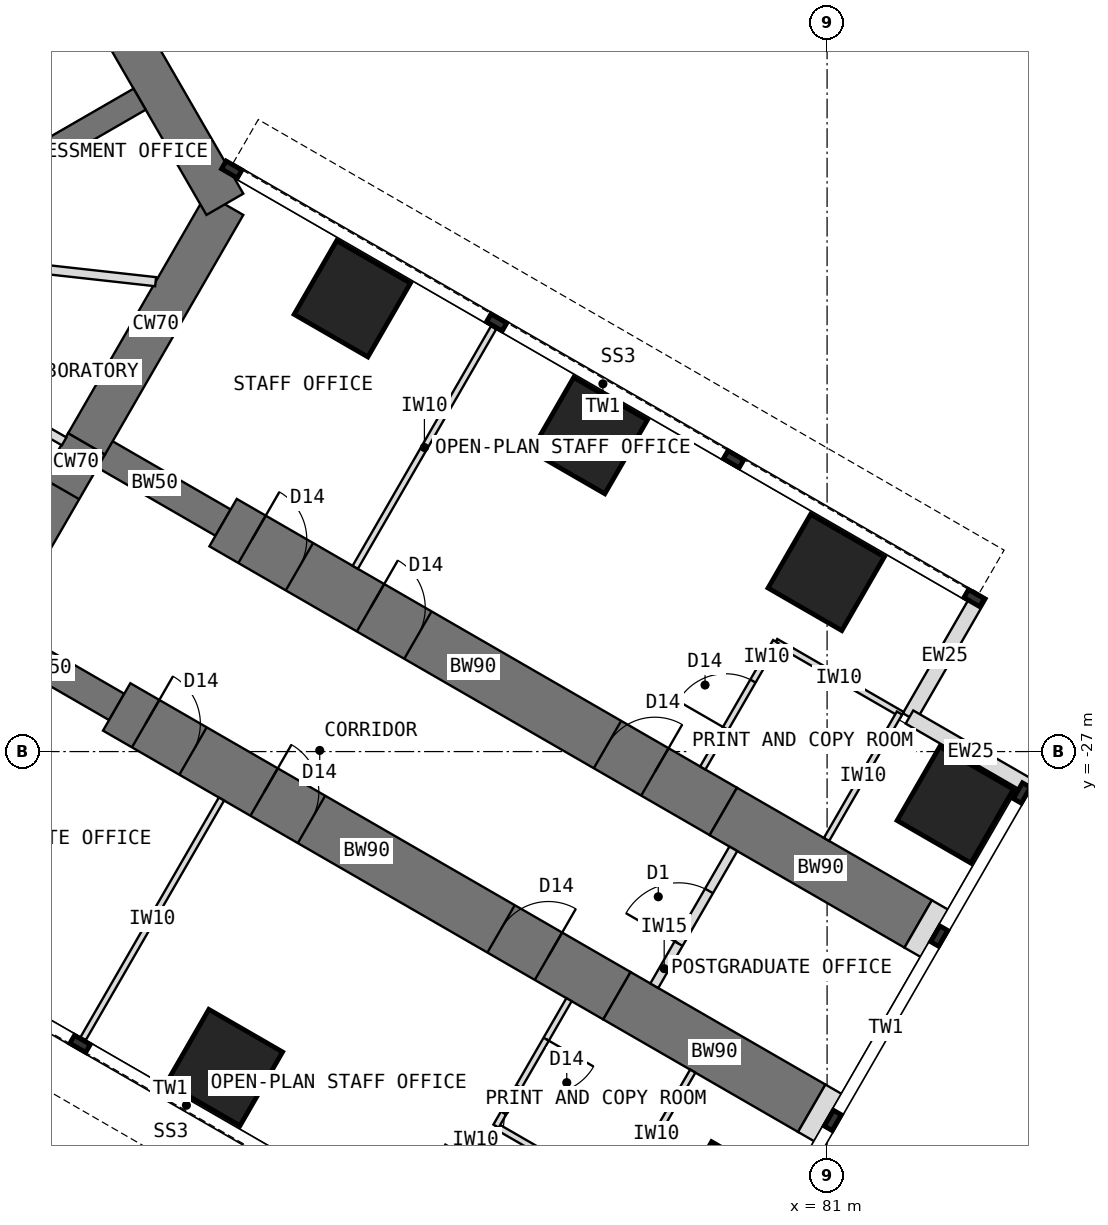
"""IFC4 building model, lengths in metres.
Left out: names, types, materials, properties, quantities, classifications, styles, units other than length and angle.
Written with IfcOpenShell. Run it as: python <this file> out.ifc"""

import sys

from ifc_helpers import new_model, si_unit, direction, frame, frame_2d, origin, origin_2d, place, context, subcontext, project, spatial, rectangle, extrude, element, fill, save


model = new_model("IFC4")
c1 = context("Model", 3, precision=1e-05, world=origin(), true_north=direction((0.0, 1.0)))
c2 = subcontext(c1, "Body", "Model", "MODEL_VIEW")
j1 = project(units=[si_unit("LENGTHUNIT", "METRE"), si_unit("PLANEANGLEUNIT", "RADIAN")], contexts=[c1])
p1 = place(None, origin())
s1 = spatial("IfcSite", under=j1, at=p1, CompositionType="ELEMENT")
p2 = place(p1, origin())
s2 = spatial("IfcBuilding", under=s1, at=p2, CompositionType="ELEMENT")
p3 = place(p2, frame((0.0, 0.0, 72.5)))
s3 = spatial("IfcBuildingStorey", under=s2, at=p3, CompositionType="ELEMENT", Elevation=72.5)
p4 = place(p3, frame((67.072, -24.97, 0.0), z_axis=(0.0, 0.0, 1.0), x_axis=(0.500010275428, 0.866019471182, 0.0)))
e1 = element("IfcWall", 1, at=p4, inside=s3, PredefinedType="SHEAR", context=c2, shape_type="SweptSolid", body=[
    extrude(rectangle(XDim=3.5, YDim=0.7, at=frame_2d((1.75, 0.0))), origin(), (0.0, 0.0, 1.0), 4.0),
])
p5 = place(p4, frame((0.85, 0.0, 0.0)))
e2 = element("IfcOpeningElement", 2, at=p5, cuts=e1, PredefinedType="OPENING", context=c2, shape_type="SweptSolid", body=[
    extrude(rectangle(XDim=1.8, YDim=2.1, at=frame_2d((0.9, 1.05))), frame((0.0, 0.36, 0.0), z_axis=(0.0, -1.0, 0.0), x_axis=(1.0, 0.0, 0.0)), (0.0, 0.0, 1.0), 0.72),
])
p6 = place(p3, frame((68.822, -21.939, 0.0), z_axis=(0.0, 0.0, 1.0), x_axis=(0.500024481964, 0.866011268655, 0.0)))
e3 = element("IfcWall", 3, at=p6, inside=s3, PredefinedType="SHEAR", context=c2, shape_type="SweptSolid", body=[
    extrude(rectangle(XDim=4.548, YDim=0.7, at=frame_2d((2.274, 0.0))), origin(), (0.0, 0.0, 1.0), 4.0),
])
p7 = place(p3, frame((71.096, -18.0, 0.0), z_axis=(0.0, 0.0, 1.0), x_axis=(-0.500005998175, 0.866021940709, 0.0)))
e4 = element("IfcWall", 4, at=p7, inside=s3, PredefinedType="SHEAR", context=c2, shape_type="SweptSolid", body=[
    extrude(rectangle(XDim=12.596, YDim=0.7, at=frame_2d((6.298, 0.0))), origin(), (0.0, 0.0, 1.0), 4.0),
])
p8 = place(p3, frame((68.822, -21.939, 0.0), z_axis=(0.0, 0.0, 1.0), x_axis=(0.866072649678, -0.499918158782, 0.0)))
e5 = element("IfcWall", 5, at=p8, inside=s3, PredefinedType="SHEAR", context=c2, shape_type="SweptSolid", body=[
    extrude(rectangle(XDim=2.592, YDim=0.5, at=frame_2d((1.296, 0.0))), origin(), (0.0, 0.0, 1.0), 4.0),
])
p9 = place(p3, frame((71.066, -23.234, 0.0), z_axis=(0.0, 0.0, 1.0), x_axis=(0.86602681393, -0.499997557548, 0.0)))
e6 = element("IfcWall", 6, at=p9, inside=s3, PredefinedType="SHEAR", context=c2, shape_type="SweptSolid", body=[
    extrude(rectangle(XDim=9.5, YDim=0.9, at=frame_2d((4.75, 0.0))), origin(), (0.0, 0.0, 1.0), 4.0),
])
p10 = place(p9, frame((0.55, 0.0, 0.0)))
e7 = element("IfcOpeningElement", 7, at=p10, cuts=e6, PredefinedType="OPENING", context=c2, shape_type="SweptSolid", body=[
    extrude(rectangle(XDim=0.9, YDim=2.1, at=frame_2d((0.45, 1.05))), frame((0.0, 0.46, 0.0), z_axis=(0.0, -1.0, 0.0), x_axis=(1.0, 0.0, 0.0)), (0.0, 0.0, 1.0), 0.92),
])
p11 = place(p9, frame((2.8, 0.0, 0.0)))
e8 = element("IfcOpeningElement", 8, at=p11, cuts=e6, PredefinedType="OPENING", context=c2, shape_type="SweptSolid", body=[
    extrude(rectangle(XDim=0.9, YDim=2.1, at=frame_2d((0.45, 1.05))), frame((0.0, 0.46, 0.0), z_axis=(0.0, -1.0, 0.0), x_axis=(1.0, 0.0, 0.0)), (0.0, 0.0, 1.0), 0.92),
])
p12 = place(p9, frame((7.3, 0.0, 0.0)))
e9 = element("IfcOpeningElement", 9, at=p12, cuts=e6, PredefinedType="OPENING", context=c2, shape_type="SweptSolid", body=[
    extrude(rectangle(XDim=0.9, YDim=2.1, at=frame_2d((0.45, 1.05))), frame((0.0, 0.46, 0.0), z_axis=(0.0, -1.0, 0.0), x_axis=(1.0, 0.0, 0.0)), (0.0, 0.0, 1.0), 0.92),
])
p13 = place(p3, frame((79.294, -27.984, 0.0), z_axis=(0.0, 0.0, 1.0), x_axis=(0.866000971088, -0.500042316284, 0.0)))
e10 = element("IfcWall", 10, at=p13, inside=s3, PredefinedType="SHEAR", context=c2, shape_type="SweptSolid", body=[
    extrude(rectangle(XDim=3.7, YDim=0.9, at=frame_2d((1.85, 0.0))), origin(), (0.0, 0.0, 1.0), 4.0),
])
p14 = place(p3, frame((67.072, -24.97, 0.0), z_axis=(0.0, 0.0, 1.0), x_axis=(0.866031863473, -0.499988811324, 0.0)))
e11 = element("IfcWall", 11, at=p14, inside=s3, PredefinedType="SHEAR", context=c2, shape_type="SweptSolid", body=[
    extrude(rectangle(XDim=2.592, YDim=0.5, at=frame_2d((1.296, 0.0))), origin(), (0.0, 0.0, 1.0), 4.0),
])
p15 = place(p3, frame((69.316, -26.266, 0.0), z_axis=(0.0, 0.0, 1.0), x_axis=(0.86602681393, -0.499997557548, 0.0)))
e12 = element("IfcWall", 12, at=p15, inside=s3, PredefinedType="SHEAR", context=c2, shape_type="SweptSolid", body=[
    extrude(rectangle(XDim=9.5, YDim=0.9, at=frame_2d((4.75, 0.0))), origin(), (0.0, 0.0, 1.0), 4.0),
])
p16 = place(p15, frame((0.55, 0.0, 0.0)))
e13 = element("IfcOpeningElement", 13, at=p16, cuts=e12, PredefinedType="OPENING", context=c2, shape_type="SweptSolid", body=[
    extrude(rectangle(XDim=0.9, YDim=2.1, at=frame_2d((0.45, 1.05))), frame((0.0, 0.46, 0.0), z_axis=(0.0, -1.0, 0.0), x_axis=(1.0, 0.0, 0.0)), (0.0, 0.0, 1.0), 0.92),
])
p17 = place(p15, frame((2.8, 0.0, 0.0)))
e14 = element("IfcOpeningElement", 14, at=p17, cuts=e12, PredefinedType="OPENING", context=c2, shape_type="SweptSolid", body=[
    extrude(rectangle(XDim=0.9, YDim=2.1, at=frame_2d((0.45, 1.05))), frame((0.0, 0.46, 0.0), z_axis=(0.0, -1.0, 0.0), x_axis=(1.0, 0.0, 0.0)), (0.0, 0.0, 1.0), 0.92),
])
p18 = place(p15, frame((7.3, 0.0, 0.0)))
e15 = element("IfcOpeningElement", 15, at=p18, cuts=e12, PredefinedType="OPENING", context=c2, shape_type="SweptSolid", body=[
    extrude(rectangle(XDim=0.9, YDim=2.1, at=frame_2d((0.45, 1.05))), frame((0.0, 0.46, 0.0), z_axis=(0.0, -1.0, 0.0), x_axis=(1.0, 0.0, 0.0)), (0.0, 0.0, 1.0), 0.92),
])
p19 = place(p3, frame((77.544, -31.016, 0.0), z_axis=(0.0, 0.0, 1.0), x_axis=(0.866029545028, -0.499992827086, 0.0)))
e16 = element("IfcWall", 16, at=p19, inside=s3, PredefinedType="SHEAR", context=c2, shape_type="SweptSolid", body=[
    extrude(rectangle(XDim=3.7, YDim=0.9, at=frame_2d((1.85, 0.0))), origin(), (0.0, 0.0, 1.0), 4.0),
])
for number, where, z_axis, x_axis in (
    (17, (73.191, -19.554, 0.0), (0.0, 0.0, 1.0), (0.5, 0.866, 0.0)),
    (18, (77.088, -21.804, 0.0), (0.0, 0.0, 1.0), (0.5, 0.866, 0.0)),
    (19, (71.088, -32.196, 0.0), (0.0, 0.0, 1.0), (0.5, 0.866, 0.0)),
    (20, (80.986, -24.054, 0.0), (0.0, 0.0, 1.0), (0.5, 0.866, 0.0)),
    (21, (83.108, -27.877, 0.0), (0.0, 0.0, 1.0), (0.5, 0.866, 0.0)),
    (22, (79.358, -34.373, 0.0), (0.0, 0.0, 1.0), (0.5, 0.866, 0.0)),
):
    element("IfcColumn", number, at=place(p3, frame(where, z_axis=z_axis, x_axis=x_axis)), inside=s3, PredefinedType="COLUMN", context=c2, shape_type="SweptSolid", body=[
        extrude(rectangle(XDim=1.4, YDim=1.4, at=origin_2d()), origin(), (0.0, 0.0, 1.0), 4.0),
    ])
for number, where, z_axis, x_axis in (
    (23, (83.517, -24.419, 0.0), (0.0, 0.0, 1.0), (-0.5, -0.866, 0.0)),
    (24, (82.355, -26.432, 0.0), (0.0, 0.0, 1.0), (0.866, -0.5, 0.0)),
):
    element("IfcWall", number, at=place(p3, frame(where, z_axis=z_axis, x_axis=x_axis)), inside=s3, PredefinedType="STANDARD", context=c2, shape_type="SweptSolid", body=[
        extrude(rectangle(XDim=2.325, YDim=0.25, at=frame_2d((1.163, 0.0))), origin(), (0.0, 0.0, 1.0), 3.8),
    ])
for number, where, z_axis, x_axis in (
    (25, (82.498, -29.834, 0.0), (0.0, 0.0, 1.0), (0.866, -0.5, 0.0)),
    (26, (80.748, -32.865, 0.0), (0.0, 0.0, 1.0), (0.866, -0.5, 0.0)),
):
    element("IfcWall", number, at=place(p3, frame(where, z_axis=z_axis, x_axis=x_axis)), inside=s3, PredefinedType="PARTITIONING", context=c2, shape_type="SweptSolid", body=[
        extrude(rectangle(XDim=0.31, YDim=0.9, at=frame_2d((0.155, 0.0))), origin(), (0.0, 0.0, 1.0), 3.8),
    ])
p20 = place(p3, frame((64.62, -19.201, 0.0), z_axis=(0.0, 0.0, 1.0), x_axis=(0.866023886965, 0.500002627198, 0.0)))
e27 = element("IfcWall", 27, at=p20, inside=s3, PredefinedType="SHEAR", context=c2, shape_type="SweptSolid", body=[
    extrude(rectangle(XDim=5.858, YDim=0.4, at=frame_2d((2.929, 0.0))), origin(), (0.0, 0.0, 1.0), 4.0),
])
p21 = place(p3, frame((73.24, -23.97, 0.0), z_axis=(0.0, 0.0, 1.0), x_axis=(0.499982560684, 0.866035472144, 0.0)))
e28 = element("IfcWall", 28, at=p21, inside=s3, PredefinedType="PARTITIONING", context=c2, shape_type="SweptSolid", body=[
    extrude(rectangle(XDim=4.55, YDim=0.1, at=frame_2d((2.275, 0.0))), origin(), (0.0, 0.0, 1.0), 3.8),
])
p22 = place(p3, frame((80.156, -25.191, 0.0), z_axis=(0.0, 0.0, 1.0), x_axis=(0.865980596518, -0.500077600433, 0.0)))
e29 = element("IfcWall", 29, at=p22, inside=s3, PredefinedType="PARTITIONING", context=c2, shape_type="SweptSolid", body=[
    extrude(rectangle(XDim=2.4, YDim=0.1, at=frame_2d((1.2, 0.0))), origin(), (0.0, 0.0, 1.0), 3.8),
])
p23 = place(p3, frame((78.956, -27.27, 0.0), z_axis=(0.0, 0.0, 1.0), x_axis=(0.500033551112, 0.866006032174, 0.0)))
e30 = element("IfcWall", 30, at=p23, inside=s3, PredefinedType="PARTITIONING", context=c2, shape_type="SweptSolid", body=[
    extrude(rectangle(XDim=2.4, YDim=0.1, at=frame_2d((1.2, 0.0))), origin(), (0.0, 0.0, 1.0), 3.8),
])
p24 = place(p23, frame((0.75, 0.0, 0.0)))
e31 = element("IfcOpeningElement", 31, at=p24, cuts=e30, PredefinedType="OPENING", context=c2, shape_type="SweptSolid", body=[
    extrude(rectangle(XDim=0.9, YDim=2.1, at=frame_2d((0.45, 1.05))), frame((0.0, 0.06, 0.0), z_axis=(0.0, -1.0, 0.0), x_axis=(1.0, 0.0, 0.0)), (0.0, 0.0, 1.0), 0.12),
])
p25 = place(p3, frame((80.991, -28.445, 0.0), z_axis=(0.0, 0.0, 1.0), x_axis=(0.500033551112, 0.866006032174, 0.0)))
e32 = element("IfcWall", 32, at=p25, inside=s3, PredefinedType="PARTITIONING", context=c2, shape_type="SweptSolid", body=[
    extrude(rectangle(XDim=2.4, YDim=0.1, at=frame_2d((1.2, 0.0))), origin(), (0.0, 0.0, 1.0), 3.8),
])
p26 = place(p3, frame((71.04, -27.78, 0.0), z_axis=(0.0, 0.0, 1.0), x_axis=(-0.499982560684, -0.866035472144, 0.0)))
e33 = element("IfcWall", 33, at=p26, inside=s3, PredefinedType="PARTITIONING", context=c2, shape_type="SweptSolid", body=[
    extrude(rectangle(XDim=4.55, YDim=0.1, at=frame_2d((2.275, 0.0))), origin(), (0.0, 0.0, 1.0), 3.8),
])
p27 = place(p3, frame((75.556, -33.159, 0.0), z_axis=(0.0, 0.0, 1.0), x_axis=(0.866024647952, -0.500001309137, 0.0)))
e34 = element("IfcWall", 34, at=p27, inside=s3, PredefinedType="PARTITIONING", context=c2, shape_type="SweptSolid", body=[
    extrude(rectangle(XDim=2.4, YDim=0.1, at=frame_2d((1.2, 0.0))), origin(), (0.0, 0.0, 1.0), 3.8),
])
p28 = place(p3, frame((76.756, -31.08, 0.0), z_axis=(0.0, 0.0, 1.0), x_axis=(-0.500001309137, -0.866024647952, 0.0)))
e35 = element("IfcWall", 35, at=p28, inside=s3, PredefinedType="PARTITIONING", context=c2, shape_type="SweptSolid", body=[
    extrude(rectangle(XDim=2.4, YDim=0.1, at=frame_2d((1.2, 0.0))), origin(), (0.0, 0.0, 1.0), 3.8),
])
p29 = place(p28, frame((0.75, 0.0, 0.0)))
e36 = element("IfcOpeningElement", 36, at=p29, cuts=e35, PredefinedType="OPENING", context=c2, shape_type="SweptSolid", body=[
    extrude(rectangle(XDim=0.9, YDim=2.1, at=frame_2d((0.45, 1.05))), frame((0.0, 0.06, 0.0), z_axis=(0.0, -1.0, 0.0), x_axis=(1.0, 0.0, 0.0)), (0.0, 0.0, 1.0), 0.12),
])
p30 = place(p3, frame((78.791, -32.255, 0.0), z_axis=(0.0, 0.0, 1.0), x_axis=(-0.500001309137, -0.866024647952, 0.0)))
e37 = element("IfcWall", 37, at=p30, inside=s3, PredefinedType="PARTITIONING", context=c2, shape_type="SweptSolid", body=[
    extrude(rectangle(XDim=2.4, YDim=0.1, at=frame_2d((1.2, 0.0))), origin(), (0.0, 0.0, 1.0), 3.8),
])
p31 = place(p3, frame((64.583, -19.664, 0.0), z_axis=(0.0, 0.0, 1.0), x_axis=(0.866025445582, -0.499999927604, 0.0)))
e38 = element("IfcWall", 38, at=p31, inside=s3, PredefinedType="PARTITIONING", context=c2, shape_type="SweptSolid", body=[
    extrude(rectangle(XDim=4.468, YDim=0.15, at=frame_2d((2.234, 0.0))), origin(), (0.0, 0.0, 1.0), 3.8),
])
p32 = place(p31, frame((1.744, 0.0, 0.0)))
e39 = element("IfcOpeningElement", 39, at=p32, cuts=e38, PredefinedType="OPENING", context=c2, shape_type="SweptSolid", body=[
    extrude(rectangle(XDim=1.0, YDim=2.1, at=frame_2d((0.5, 1.05))), frame((0.0, 0.085, 0.0), z_axis=(0.0, -1.0, 0.0), x_axis=(1.0, 0.0, 0.0)), (0.0, 0.0, 1.0), 0.17),
])
p33 = place(p3, frame((65.377, -18.764, 0.0), z_axis=(0.0, 0.0, 1.0), x_axis=(0.993886318744, -0.110408266965, 0.0)))
e40 = element("IfcWall", 40, at=p33, inside=s3, PredefinedType="PARTITIONING", context=c2, shape_type="SweptSolid", body=[
    extrude(rectangle(XDim=4.608, YDim=0.15, at=frame_2d((2.304, 0.0))), origin(), (0.0, 0.0, 1.0), 3.8),
])
p34 = place(p33, frame((1.804, 0.0, 0.0)))
e41 = element("IfcOpeningElement", 41, at=p34, cuts=e40, PredefinedType="OPENING", context=c2, shape_type="SweptSolid", body=[
    extrude(rectangle(XDim=1.0, YDim=2.1, at=frame_2d((0.5, 1.05))), frame((0.0, 0.085, 0.0), z_axis=(0.0, -1.0, 0.0), x_axis=(1.0, 0.0, 0.0)), (0.0, 0.0, 1.0), 0.17),
])
p35 = place(p3, frame((78.158, -30.851, 0.0), z_axis=(0.0, 0.0, 1.0), x_axis=(0.500006934395, 0.866021400173, 0.0)))
e42 = element("IfcWall", 42, at=p35, inside=s3, PredefinedType="PARTITIONING", context=c2, shape_type="SweptSolid", body=[
    extrude(rectangle(XDim=2.6, YDim=0.15, at=frame_2d((1.3, 0.0))), origin(), (0.0, 0.0, 1.0), 3.8),
])
p36 = place(p35, frame((0.8, 0.0, 0.0)))
e43 = element("IfcOpeningElement", 43, at=p36, cuts=e42, PredefinedType="OPENING", context=c2, shape_type="SweptSolid", body=[
    extrude(rectangle(XDim=1.0, YDim=2.1, at=frame_2d((0.5, 1.05))), frame((0.0, 0.085, 0.0), z_axis=(0.0, -1.0, 0.0), x_axis=(1.0, 0.0, 0.0)), (0.0, 0.0, 1.0), 0.17),
])
p37 = place(p5, origin())
e44 = element("IfcDoor", 44, at=p37, inside=s3, OperationType="DOUBLE_DOOR_DOUBLE_SWING", PredefinedType="DOOR", context=c2, shape_type="SweptSolid", body=[
    extrude(rectangle(XDim=1.72, YDim=2.06, at=frame_2d((0.9, 1.03))), frame((0.0, 0.025, 0.0), z_axis=(0.0, -1.0, 0.0), x_axis=(1.0, 0.0, 0.0)), (0.0, 0.0, 1.0), 0.05),
    extrude(rectangle(XDim=0.04, YDim=2.1, at=frame_2d((0.02, 1.05))), frame((0.0, 0.35, 0.0), z_axis=(0.0, -1.0, 0.0), x_axis=(1.0, 0.0, 0.0)), (0.0, 0.0, 1.0), 0.699),
    extrude(rectangle(XDim=0.04, YDim=2.1, at=frame_2d((1.78, 1.05))), frame((0.0, 0.35, 0.0), z_axis=(0.0, -1.0, 0.0), x_axis=(1.0, 0.0, 0.0)), (0.0, 0.0, 1.0), 0.699),
    extrude(rectangle(XDim=1.72, YDim=0.04, at=frame_2d((0.9, 2.08))), frame((0.0, 0.35, 0.0), z_axis=(0.0, -1.0, 0.0), x_axis=(1.0, 0.0, 0.0)), (0.0, 0.0, 1.0), 0.699),
])
fill(e2, e44)
p38 = place(p24, origin())
e45 = element("IfcDoor", 45, at=p38, inside=s3, OperationType="SINGLE_SWING_LEFT", PredefinedType="DOOR", context=c2, shape_type="SweptSolid", body=[
    extrude(rectangle(XDim=0.9, YDim=2.1, at=frame_2d((0.45, 1.05))), frame((0.0, 0.025, 0.0), z_axis=(0.0, -1.0, 0.0), x_axis=(1.0, 0.0, 0.0)), (0.0, 0.0, 1.0), 0.05),
])
fill(e31, e45)
p39 = place(p29, origin())
e46 = element("IfcDoor", 46, at=p39, inside=s3, OperationType="SINGLE_SWING_LEFT", PredefinedType="DOOR", context=c2, shape_type="SweptSolid", body=[
    extrude(rectangle(XDim=0.9, YDim=2.1, at=frame_2d((0.45, 1.05))), frame((0.0, 0.025, 0.0), z_axis=(0.0, -1.0, 0.0), x_axis=(1.0, 0.0, 0.0)), (0.0, 0.0, 1.0), 0.05),
])
fill(e36, e46)
p40 = place(p36, origin())
e47 = element("IfcDoor", 47, at=p40, inside=s3, OperationType="SINGLE_SWING_LEFT", PredefinedType="DOOR", context=c2, shape_type="SweptSolid", body=[
    extrude(rectangle(XDim=1.0, YDim=2.1, at=frame_2d((0.5, 1.05))), frame((0.0, 0.025, 0.0), z_axis=(0.0, -1.0, 0.0), x_axis=(1.0, 0.0, 0.0)), (0.0, 0.0, 1.0), 0.05),
])
fill(e43, e47)
p41 = place(p10, origin())
e48 = element("IfcDoor", 48, at=p41, inside=s3, OperationType="SINGLE_SWING_LEFT", PredefinedType="DOOR", context=c2, shape_type="SweptSolid", body=[
    extrude(rectangle(XDim=0.82, YDim=2.06, at=frame_2d((0.45, 1.03))), frame((0.0, 0.025, 0.0), z_axis=(0.0, -1.0, 0.0), x_axis=(1.0, 0.0, 0.0)), (0.0, 0.0, 1.0), 0.05),
    extrude(rectangle(XDim=0.04, YDim=2.1, at=frame_2d((0.02, 1.05))), frame((0.0, 0.45, 0.0), z_axis=(0.0, -1.0, 0.0), x_axis=(1.0, 0.0, 0.0)), (0.0, 0.0, 1.0), 0.899),
    extrude(rectangle(XDim=0.04, YDim=2.1, at=frame_2d((0.88, 1.05))), frame((0.0, 0.45, 0.0), z_axis=(0.0, -1.0, 0.0), x_axis=(1.0, 0.0, 0.0)), (0.0, 0.0, 1.0), 0.899),
    extrude(rectangle(XDim=0.82, YDim=0.04, at=frame_2d((0.45, 2.08))), frame((0.0, 0.45, 0.0), z_axis=(0.0, -1.0, 0.0), x_axis=(1.0, 0.0, 0.0)), (0.0, 0.0, 1.0), 0.899),
])
fill(e7, e48)
p42 = place(p11, origin())
e49 = element("IfcDoor", 49, at=p42, inside=s3, OperationType="SINGLE_SWING_LEFT", PredefinedType="DOOR", context=c2, shape_type="SweptSolid", body=[
    extrude(rectangle(XDim=0.82, YDim=2.06, at=frame_2d((0.45, 1.03))), frame((0.0, 0.025, 0.0), z_axis=(0.0, -1.0, 0.0), x_axis=(1.0, 0.0, 0.0)), (0.0, 0.0, 1.0), 0.05),
    extrude(rectangle(XDim=0.04, YDim=2.1, at=frame_2d((0.02, 1.05))), frame((0.0, 0.45, 0.0), z_axis=(0.0, -1.0, 0.0), x_axis=(1.0, 0.0, 0.0)), (0.0, 0.0, 1.0), 0.899),
    extrude(rectangle(XDim=0.04, YDim=2.1, at=frame_2d((0.88, 1.05))), frame((0.0, 0.45, 0.0), z_axis=(0.0, -1.0, 0.0), x_axis=(1.0, 0.0, 0.0)), (0.0, 0.0, 1.0), 0.899),
    extrude(rectangle(XDim=0.82, YDim=0.04, at=frame_2d((0.45, 2.08))), frame((0.0, 0.45, 0.0), z_axis=(0.0, -1.0, 0.0), x_axis=(1.0, 0.0, 0.0)), (0.0, 0.0, 1.0), 0.899),
])
fill(e8, e49)
p43 = place(p12, origin())
e50 = element("IfcDoor", 50, at=p43, inside=s3, OperationType="SINGLE_SWING_RIGHT", PredefinedType="DOOR", context=c2, shape_type="SweptSolid", body=[
    extrude(rectangle(XDim=0.82, YDim=2.06, at=frame_2d((0.45, 1.03))), frame((0.0, 0.025, 0.0), z_axis=(0.0, -1.0, 0.0), x_axis=(1.0, 0.0, 0.0)), (0.0, 0.0, 1.0), 0.05),
    extrude(rectangle(XDim=0.04, YDim=2.1, at=frame_2d((0.02, 1.05))), frame((0.0, 0.45, 0.0), z_axis=(0.0, -1.0, 0.0), x_axis=(1.0, 0.0, 0.0)), (0.0, 0.0, 1.0), 0.899),
    extrude(rectangle(XDim=0.04, YDim=2.1, at=frame_2d((0.88, 1.05))), frame((0.0, 0.45, 0.0), z_axis=(0.0, -1.0, 0.0), x_axis=(1.0, 0.0, 0.0)), (0.0, 0.0, 1.0), 0.899),
    extrude(rectangle(XDim=0.82, YDim=0.04, at=frame_2d((0.45, 2.08))), frame((0.0, 0.45, 0.0), z_axis=(0.0, -1.0, 0.0), x_axis=(1.0, 0.0, 0.0)), (0.0, 0.0, 1.0), 0.899),
])
fill(e9, e50)
p44 = place(p16, origin())
e51 = element("IfcDoor", 51, at=p44, inside=s3, OperationType="SINGLE_SWING_LEFT", PredefinedType="DOOR", context=c2, shape_type="SweptSolid", body=[
    extrude(rectangle(XDim=0.82, YDim=2.06, at=frame_2d((0.45, 1.03))), frame((0.0, 0.025, 0.0), z_axis=(0.0, -1.0, 0.0), x_axis=(1.0, 0.0, 0.0)), (0.0, 0.0, 1.0), 0.05),
    extrude(rectangle(XDim=0.04, YDim=2.1, at=frame_2d((0.02, 1.05))), frame((0.0, 0.45, 0.0), z_axis=(0.0, -1.0, 0.0), x_axis=(1.0, 0.0, 0.0)), (0.0, 0.0, 1.0), 0.899),
    extrude(rectangle(XDim=0.04, YDim=2.1, at=frame_2d((0.88, 1.05))), frame((0.0, 0.45, 0.0), z_axis=(0.0, -1.0, 0.0), x_axis=(1.0, 0.0, 0.0)), (0.0, 0.0, 1.0), 0.899),
    extrude(rectangle(XDim=0.82, YDim=0.04, at=frame_2d((0.45, 2.08))), frame((0.0, 0.45, 0.0), z_axis=(0.0, -1.0, 0.0), x_axis=(1.0, 0.0, 0.0)), (0.0, 0.0, 1.0), 0.899),
])
fill(e13, e51)
p45 = place(p17, origin())
e52 = element("IfcDoor", 52, at=p45, inside=s3, OperationType="SINGLE_SWING_LEFT", PredefinedType="DOOR", context=c2, shape_type="SweptSolid", body=[
    extrude(rectangle(XDim=0.82, YDim=2.06, at=frame_2d((0.45, 1.03))), frame((0.0, 0.025, 0.0), z_axis=(0.0, -1.0, 0.0), x_axis=(1.0, 0.0, 0.0)), (0.0, 0.0, 1.0), 0.05),
    extrude(rectangle(XDim=0.04, YDim=2.1, at=frame_2d((0.02, 1.05))), frame((0.0, 0.45, 0.0), z_axis=(0.0, -1.0, 0.0), x_axis=(1.0, 0.0, 0.0)), (0.0, 0.0, 1.0), 0.899),
    extrude(rectangle(XDim=0.04, YDim=2.1, at=frame_2d((0.88, 1.05))), frame((0.0, 0.45, 0.0), z_axis=(0.0, -1.0, 0.0), x_axis=(1.0, 0.0, 0.0)), (0.0, 0.0, 1.0), 0.899),
    extrude(rectangle(XDim=0.82, YDim=0.04, at=frame_2d((0.45, 2.08))), frame((0.0, 0.45, 0.0), z_axis=(0.0, -1.0, 0.0), x_axis=(1.0, 0.0, 0.0)), (0.0, 0.0, 1.0), 0.899),
])
fill(e14, e52)
p46 = place(p18, origin())
e53 = element("IfcDoor", 53, at=p46, inside=s3, OperationType="SINGLE_SWING_RIGHT", PredefinedType="DOOR", context=c2, shape_type="SweptSolid", body=[
    extrude(rectangle(XDim=0.82, YDim=2.06, at=frame_2d((0.45, 1.03))), frame((0.0, 0.025, 0.0), z_axis=(0.0, -1.0, 0.0), x_axis=(1.0, 0.0, 0.0)), (0.0, 0.0, 1.0), 0.05),
    extrude(rectangle(XDim=0.04, YDim=2.1, at=frame_2d((0.02, 1.05))), frame((0.0, 0.45, 0.0), z_axis=(0.0, -1.0, 0.0), x_axis=(1.0, 0.0, 0.0)), (0.0, 0.0, 1.0), 0.899),
    extrude(rectangle(XDim=0.04, YDim=2.1, at=frame_2d((0.88, 1.05))), frame((0.0, 0.45, 0.0), z_axis=(0.0, -1.0, 0.0), x_axis=(1.0, 0.0, 0.0)), (0.0, 0.0, 1.0), 0.899),
    extrude(rectangle(XDim=0.82, YDim=0.04, at=frame_2d((0.45, 2.08))), frame((0.0, 0.45, 0.0), z_axis=(0.0, -1.0, 0.0), x_axis=(1.0, 0.0, 0.0)), (0.0, 0.0, 1.0), 0.899),
])
fill(e15, e53)
save(model, sys.argv[1])
